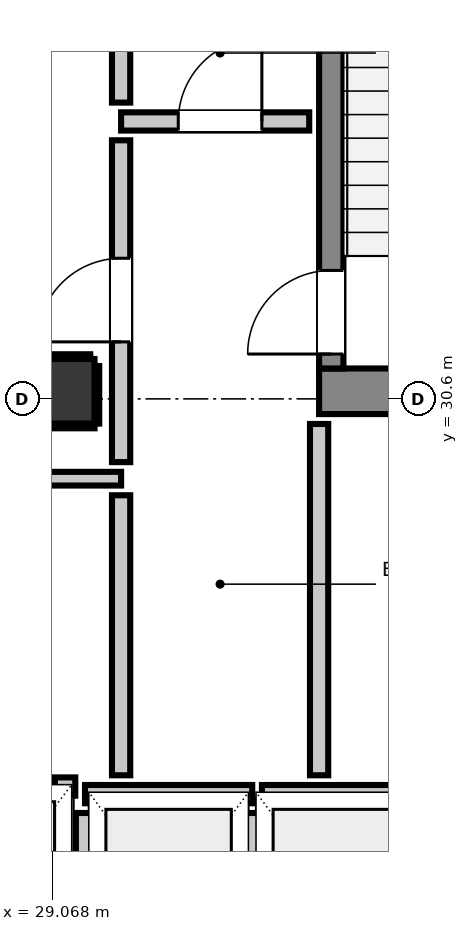
"""IFC4 building model, lengths in metres.
Left out: names, types, materials, properties, quantities, classifications, styles, units other than length and angle.
Written with IfcOpenShell. Run it as: python <this file> out.ifc"""

import sys

from ifc_helpers import new_model, si_unit, direction, frame, frame_2d, origin, origin_2d, place, context, subcontext, project, spatial, rectangle, extrude, element, fill, save


model = new_model("IFC4")
c1 = context("Model", 3, precision=1e-05, world=origin(), true_north=direction((0.0, 1.0)))
c2 = subcontext(c1, "Body", "Model", "MODEL_VIEW")
j1 = project(units=[si_unit("LENGTHUNIT", "METRE"), si_unit("PLANEANGLEUNIT", "RADIAN")], contexts=[c1])
p1 = place(None, origin())
s1 = spatial("IfcSite", under=j1, at=p1, CompositionType="ELEMENT")
p2 = place(p1, origin())
s2 = spatial("IfcBuilding", under=s1, at=p2, CompositionType="ELEMENT")
p3 = place(p2, frame((0.0, 0.0, 213.4)))
s3 = spatial("IfcBuildingStorey", under=s2, at=p3, CompositionType="ELEMENT", Elevation=213.4)
p4 = place(p3, frame((32.58, 30.7, 0.0), z_axis=(0.0, 0.0, 1.0), x_axis=(1.0, 0.0, 0.0)))
e1 = element("IfcWall", 1, at=p4, inside=s3, PredefinedType="SHEAR", context=c2, shape_type="SweptSolid", body=[
    extrude(rectangle(XDim=3.54, YDim=0.6, at=frame_2d((1.77, 0.0))), origin(), (0.0, 0.0, 1.0), 3.32),
])
p5 = place(p3, frame((32.74, 31.0, 0.0), z_axis=(0.0, 0.0, 1.0), x_axis=(0.0, 1.0, 0.0)))
e2 = element("IfcWall", 2, at=p5, inside=s3, PredefinedType="SHEAR", context=c2, shape_type="SweptSolid", body=[
    extrude(rectangle(XDim=7.8, YDim=0.32, at=frame_2d((3.9, 0.0))), origin(), (0.0, 0.0, 1.0), 3.32),
])
p6 = place(p5, frame((0.19, 0.0, 0.0)))
e3 = element("IfcOpeningElement", 3, at=p6, cuts=e2, PredefinedType="OPENING", context=c2, shape_type="SweptSolid", body=[
    extrude(rectangle(XDim=1.1, YDim=2.15, at=frame_2d((0.55, 1.075))), frame((0.0, 0.17, 0.0), z_axis=(0.0, -1.0, 0.0), x_axis=(1.0, 0.0, 0.0)), (0.0, 0.0, 1.0), 0.34),
])
p7 = place(p3, frame((29.2, 30.7, 0.0), z_axis=(0.0, 0.0, 1.0), x_axis=(1.0, 0.0, 0.0)))
e4 = element("IfcColumn", 4, at=p7, inside=s3, PredefinedType="COLUMN", context=c2, shape_type="SweptSolid", body=[
    extrude(rectangle(XDim=0.85, YDim=0.85, at=origin_2d()), origin(), (0.0, 0.0, 1.0), 3.32),
])
p8 = place(p3, frame((29.5, 25.4, 0.0), z_axis=(0.0, 0.0, 1.0), x_axis=(1.0, 0.0, 0.0)))
e5 = element("IfcWall", 5, at=p8, inside=s3, PredefinedType="PARTITIONING", context=c2, shape_type="SweptSolid", body=[
    extrude(rectangle(XDim=2.2, YDim=0.24, at=frame_2d((1.1, 0.0))), origin(), (0.0, 0.0, 1.0), 3.1),
])
p9 = place(p3, frame((29.5, 22.848, 0.0), z_axis=(0.0, 0.0, 1.0), x_axis=(0.0, 1.0, 0.0)))
e6 = element("IfcWall", 6, at=p9, inside=s3, PredefinedType="PARTITIONING", context=c2, shape_type="SweptSolid", body=[
    extrude(rectangle(XDim=2.304, YDim=0.24, at=frame_2d((1.152, 0.0))), origin(), (0.0, 0.0, 1.0), 2.335),
])
p10 = place(p3, frame((31.7, 22.848, 0.0), z_axis=(0.0, 0.0, 1.0), x_axis=(0.0, 1.0, 0.0)))
e7 = element("IfcWall", 7, at=p10, inside=s3, PredefinedType="PARTITIONING", context=c2, shape_type="SweptSolid", body=[
    extrude(rectangle(XDim=2.304, YDim=0.24, at=frame_2d((1.152, 0.0))), origin(), (0.0, 0.0, 1.0), 3.1),
])
p11 = place(p3, frame((31.828, 25.4, 0.0), z_axis=(0.0, 0.0, 1.0), x_axis=(1.0, 0.0, 0.0)))
e8 = element("IfcWall", 8, at=p11, inside=s3, PredefinedType="PARTITIONING", context=c2, shape_type="SweptSolid", body=[
    extrude(rectangle(XDim=2.072, YDim=0.24, at=frame_2d((1.036, 0.0))), origin(), (0.0, 0.0, 1.0), 3.1),
])
p12 = place(p3, frame((29.103, 25.5, 0.0), z_axis=(0.0, 0.0, 1.0), x_axis=(1.0, 0.0, 0.0)))
e9 = element("IfcWall", 9, at=p12, inside=s3, PredefinedType="PARTITIONING", context=c2, shape_type="SweptSolid", body=[
    extrude(rectangle(XDim=0.269, YDim=0.24, at=frame_2d((0.135, 0.0))), origin(), (0.0, 0.0, 1.0), 3.1),
])
p13 = place(p3, frame((29.975, 34.25, 0.0), z_axis=(0.0, 0.0, 1.0), x_axis=(1.0, 0.0, 0.0)))
e10 = element("IfcWall", 10, at=p13, inside=s3, PredefinedType="PARTITIONING", context=c2, shape_type="SweptSolid", body=[
    extrude(rectangle(XDim=2.475, YDim=0.24, at=frame_2d((1.237, 0.0))), origin(), (0.0, 0.0, 1.0), 3.1),
])
p14 = place(p13, frame((0.752, 0.0, 0.0)))
e11 = element("IfcOpeningElement", 11, at=p14, cuts=e10, PredefinedType="OPENING", context=c2, shape_type="SweptSolid", body=[
    extrude(rectangle(XDim=1.1, YDim=2.15, at=frame_2d((0.55, 1.075))), frame((0.0, 0.13, 0.0), z_axis=(0.0, -1.0, 0.0), x_axis=(1.0, 0.0, 0.0)), (0.0, 0.0, 1.0), 0.26),
])
p15 = place(p3, frame((28.593, 29.55, 0.0), z_axis=(0.0, 0.0, 1.0), x_axis=(1.0, 0.0, 0.0)))
e12 = element("IfcWall", 12, at=p15, inside=s3, PredefinedType="PARTITIONING", context=c2, shape_type="SweptSolid", body=[
    extrude(rectangle(XDim=1.382, YDim=0.18, at=frame_2d((0.691, 0.0))), origin(), (0.0, 0.0, 1.0), 3.1),
])
p16 = place(p3, frame((29.975, 25.648, 0.0), z_axis=(0.0, 0.0, 1.0), x_axis=(0.0, 1.0, 0.0)))
e13 = element("IfcWall", 13, at=p16, inside=s3, PredefinedType="PARTITIONING", context=c2, shape_type="SweptSolid", body=[
    extrude(rectangle(XDim=3.684, YDim=0.24, at=frame_2d((1.842, 0.0))), origin(), (0.0, 0.0, 1.0), 3.1),
])
p17 = place(p3, frame((29.975, 29.768, 0.0), z_axis=(0.0, 0.0, 1.0), x_axis=(0.0, 1.0, 0.0)))
e14 = element("IfcWall", 14, at=p17, inside=s3, PredefinedType="PARTITIONING", context=c2, shape_type="SweptSolid", body=[
    extrude(rectangle(XDim=4.234, YDim=0.24, at=frame_2d((2.117, 0.0))), origin(), (0.0, 0.0, 1.0), 3.1),
])
p18 = place(p17, frame((1.582, 0.0, 0.0)))
e15 = element("IfcOpeningElement", 15, at=p18, cuts=e14, PredefinedType="OPENING", context=c2, shape_type="SweptSolid", body=[
    extrude(rectangle(XDim=1.1, YDim=2.15, at=frame_2d((0.55, 1.075))), frame((0.0, 0.13, 0.0), z_axis=(0.0, -1.0, 0.0), x_axis=(1.0, 0.0, 0.0)), (0.0, 0.0, 1.0), 0.26),
])
p19 = place(p3, frame((29.975, 34.498, 0.0), z_axis=(0.0, 0.0, 1.0), x_axis=(0.0, 1.0, 0.0)))
e16 = element("IfcWall", 16, at=p19, inside=s3, PredefinedType="PARTITIONING", context=c2, shape_type="SweptSolid", body=[
    extrude(rectangle(XDim=0.934, YDim=0.24, at=frame_2d((0.467, 0.0))), origin(), (0.0, 0.0, 1.0), 3.1),
])
p20 = place(p3, frame((32.58, 25.648, 0.0), z_axis=(0.0, 0.0, 1.0), x_axis=(0.0, 1.0, 0.0)))
e17 = element("IfcWall", 17, at=p20, inside=s3, PredefinedType="PARTITIONING", context=c2, shape_type="SweptSolid", body=[
    extrude(rectangle(XDim=4.622, YDim=0.24, at=frame_2d((2.311, 0.0))), origin(), (0.0, 0.0, 1.0), 3.1),
])
p21 = place(p3, frame((28.775, 30.243, 0.0), z_axis=(0.0, 0.0, 1.0), x_axis=(1.0, 0.0, 0.0)))
e18 = element("IfcWall", 18, at=p21, inside=s3, PredefinedType="PARTITIONING", context=c2, shape_type="SweptSolid", body=[
    extrude(rectangle(XDim=0.85, YDim=0.06, at=frame_2d((0.425, 0.0))), origin(), (0.0, 0.0, 1.0), 1.45),
])
p22 = place(p3, frame((28.775, 31.157, 0.0), z_axis=(0.0, 0.0, 1.0), x_axis=(1.0, 0.0, 0.0)))
e19 = element("IfcWall", 19, at=p22, inside=s3, PredefinedType="PARTITIONING", context=c2, shape_type="SweptSolid", body=[
    extrude(rectangle(XDim=0.794, YDim=0.06, at=frame_2d((0.397, 0.0))), origin(), (0.0, 0.0, 1.0), 1.45),
])
p23 = place(p3, frame((29.657, 30.275, 0.0), z_axis=(0.0, 0.0, 1.0), x_axis=(0.0, 1.0, 0.0)))
e20 = element("IfcWall", 20, at=p23, inside=s3, PredefinedType="PARTITIONING", context=c2, shape_type="SweptSolid", body=[
    extrude(rectangle(XDim=0.757, YDim=0.06, at=frame_2d((0.378, 0.0))), origin(), (0.0, 0.0, 1.0), 1.45),
])
p24 = place(p6, origin())
e21 = element("IfcDoor", 21, at=p24, inside=s3, OperationType="SINGLE_SWING_LEFT", PredefinedType="DOOR", context=c2, shape_type="SweptSolid", body=[
    extrude(rectangle(XDim=1.1, YDim=2.15, at=frame_2d((0.55, 1.075))), frame((0.0, 0.025, 0.0), z_axis=(0.0, -1.0, 0.0), x_axis=(1.0, 0.0, 0.0)), (0.0, 0.0, 1.0), 0.05),
])
fill(e3, e21)
p25 = place(p18, origin())
e22 = element("IfcDoor", 22, at=p25, inside=s3, OperationType="SINGLE_SWING_LEFT", PredefinedType="DOOR", context=c2, shape_type="SweptSolid", body=[
    extrude(rectangle(XDim=1.1, YDim=2.15, at=frame_2d((0.55, 1.075))), frame((0.0, 0.025, 0.0), z_axis=(0.0, -1.0, 0.0), x_axis=(1.0, 0.0, 0.0)), (0.0, 0.0, 1.0), 0.05),
])
fill(e15, e22)
p26 = place(p14, origin())
e23 = element("IfcDoor", 23, at=p26, inside=s3, OperationType="SINGLE_SWING_RIGHT", PredefinedType="DOOR", context=c2, shape_type="SweptSolid", body=[
    extrude(rectangle(XDim=1.1, YDim=2.15, at=frame_2d((0.55, 1.075))), frame((0.0, 0.025, 0.0), z_axis=(0.0, -1.0, 0.0), x_axis=(1.0, 0.0, 0.0)), (0.0, 0.0, 1.0), 0.05),
])
fill(e11, e23)
save(model, sys.argv[1])
